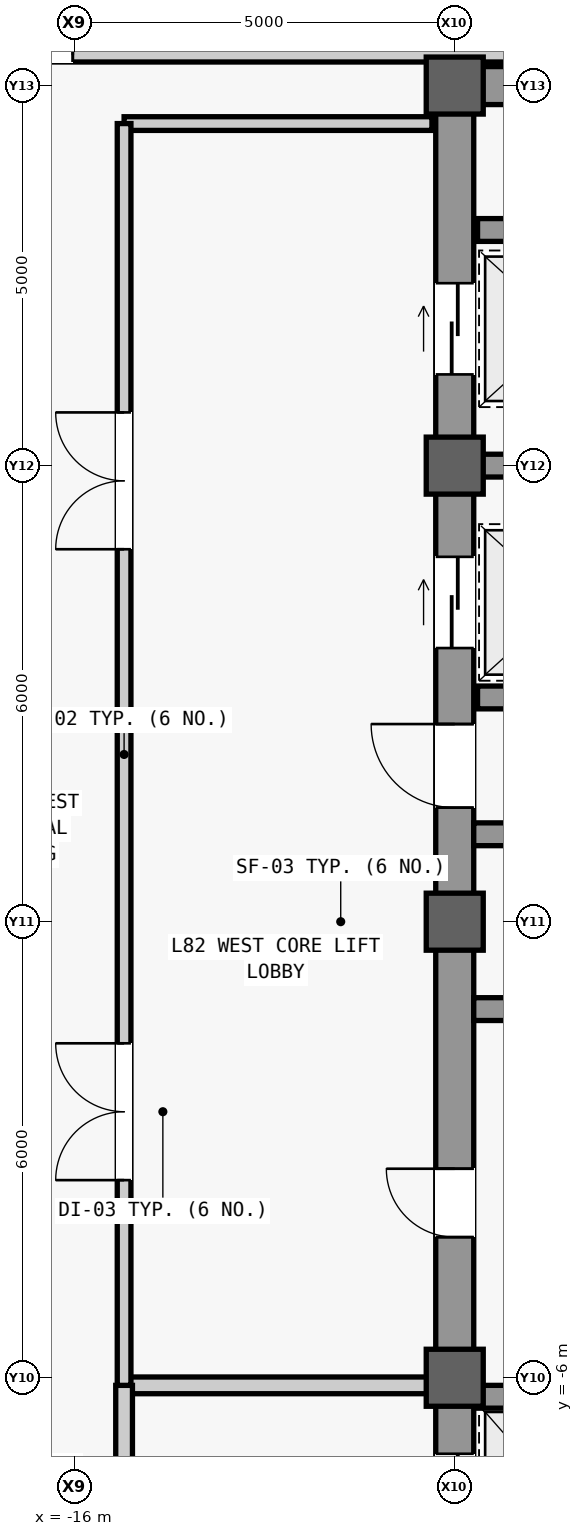
"""IFC4 building model, lengths in metres.
Left out: names, types, materials, properties, quantities, classifications, styles, units other than length and angle.
Written with IfcOpenShell. Run it as: python <this file> out.ifc"""

import sys

from ifc_helpers import new_model, si_unit, direction, frame, frame_2d, origin, origin_2d, place, context, subcontext, project, spatial, rectangle, extrude, source, transform, mapped, element, fill, save


model = new_model("IFC4")
c1 = context("Model", 3, precision=1e-05, world=origin(), true_north=direction((0.0, 1.0)))
c2 = subcontext(c1, "Body", "Model", "MODEL_VIEW")
j1 = project(units=[si_unit("LENGTHUNIT", "METRE"), si_unit("PLANEANGLEUNIT", "RADIAN")], contexts=[c1])
p1 = place(None, origin())
s1 = spatial("IfcSite", under=j1, at=p1, CompositionType="ELEMENT")
p2 = place(p1, origin())
s2 = spatial("IfcBuilding", under=s1, at=p2, CompositionType="ELEMENT")
p3 = place(p2, frame((0.0, 0.0, 346.3)))
s3 = spatial("IfcBuildingStorey", under=s2, at=p3, CompositionType="ELEMENT", Elevation=346.3)
m1 = source(origin(), c2, "Body", "SweptSolid", [
    extrude(rectangle(XDim=22.0, YDim=0.5, at=frame_2d((11.0, 0.0))), origin(), (0.0, 0.0, 1.0), 3.74),
])
p4 = place(p3, frame((-11.0, -11.0, 0.0), z_axis=(0.0, 0.0, 1.0), x_axis=(0.0, 1.0, 0.0)))
e1 = element("IfcWall", 1, at=p4, inside=s3, PredefinedType="SHEAR", context=c2, shape_type="MappedRepresentation", body=[
    mapped(m1, transform((0.0, 0.0, 0.0), scale=1.0)),
])
m2 = source(origin(), c2, "Body", "SweptSolid", [
    extrude(rectangle(XDim=1.1, YDim=2.2, at=frame_2d((0.55, 1.1))), frame((0.0, 0.26, 0.0), z_axis=(0.0, -1.0, 0.0), x_axis=(1.0, 0.0, 0.0)), (0.0, 0.0, 1.0), 0.52),
])
p5 = place(p4, frame((0.8, 0.0, 0.0)))
e2 = element("IfcOpeningElement", 2, at=p5, cuts=e1, PredefinedType="OPENING", context=c2, shape_type="MappedRepresentation", body=[
    mapped(m2, transform((0.0, 0.0, 0.0), scale=1.0)),
])
p6 = place(p4, frame((12.5, 0.0, 0.0)))
e3 = element("IfcOpeningElement", 3, at=p6, cuts=e1, PredefinedType="OPENING", context=c2, shape_type="MappedRepresentation", body=[
    mapped(m2, transform((0.0, 0.0, 0.0), scale=1.0)),
])
m3 = source(origin(), c2, "Body", "SweptSolid", [
    extrude(rectangle(XDim=0.9, YDim=2.15, at=frame_2d((0.45, 1.075))), frame((0.0, 0.26, 0.0), z_axis=(0.0, -1.0, 0.0), x_axis=(1.0, 0.0, 0.0)), (0.0, 0.0, 1.0), 0.52),
])
p7 = place(p4, frame((6.85, 0.0, 0.0)))
e4 = element("IfcOpeningElement", 4, at=p7, cuts=e1, PredefinedType="OPENING", context=c2, shape_type="MappedRepresentation", body=[
    mapped(m3, transform((0.0, 0.0, 0.0), scale=1.0)),
])
m4 = source(origin(), c2, "Body", "SweptSolid", [
    extrude(rectangle(XDim=1.2, YDim=2.3, at=frame_2d((0.6, 1.15))), frame((0.0, 0.26, 0.0), z_axis=(0.0, -1.0, 0.0), x_axis=(1.0, 0.0, 0.0)), (0.0, 0.0, 1.0), 0.52),
])
p8 = place(p4, frame((14.6, 0.0, 0.0)))
e5 = element("IfcOpeningElement", 5, at=p8, cuts=e1, PredefinedType="OPENING", context=c2, shape_type="MappedRepresentation", body=[
    mapped(m4, transform((0.0, 0.0, 0.0), scale=1.0)),
])
p9 = place(p4, frame((18.2, 0.0, 0.0)))
e6 = element("IfcOpeningElement", 6, at=p9, cuts=e1, PredefinedType="OPENING", context=c2, shape_type="MappedRepresentation", body=[
    mapped(m4, transform((0.0, 0.0, 0.0), scale=1.0)),
])
m5 = source(origin(), c2, "Body", "SweptSolid", [
    extrude(rectangle(XDim=1.3, YDim=2.3, at=frame_2d((0.65, 1.15))), frame((0.0, 0.26, 0.0), z_axis=(0.0, -1.0, 0.0), x_axis=(1.0, 0.0, 0.0)), (0.0, 0.0, 1.0), 0.52),
])
p10 = place(p4, frame((2.7, 0.0, 0.0)))
e7 = element("IfcOpeningElement", 7, at=p10, cuts=e1, PredefinedType="OPENING", context=c2, shape_type="MappedRepresentation", body=[
    mapped(m5, transform((0.0, 0.0, 0.0), scale=1.0)),
])
m6 = source(origin(), c2, "Body", "SweptSolid", [
    extrude(rectangle(XDim=5.9, YDim=0.5, at=frame_2d((2.95, 0.0))), origin(), (0.0, 0.0, 1.0), 3.74),
])
p11 = place(p3, frame((-10.75, 11.0, 0.0), z_axis=(0.0, 0.0, 1.0), x_axis=(1.0, 0.0, 0.0)))
e8 = element("IfcWall", 8, at=p11, inside=s3, PredefinedType="SHEAR", context=c2, shape_type="MappedRepresentation", body=[
    mapped(m6, transform((0.0, 0.0, 0.0), scale=1.0)),
])
m7 = source(origin(), c2, "Body", "SweptSolid", [
    extrude(rectangle(XDim=5.65, YDim=0.3, at=frame_2d((2.825, 0.0))), origin(), (0.0, 0.0, 1.0), 3.74),
])
for number, where, z_axis, x_axis in (
    (9, (-10.75, -1.15, 0.0), (0.0, 0.0, 1.0), (1.0, 0.0, 0.0)),
    (10, (-10.75, 1.15, 0.0), (0.0, 0.0, 1.0), (1.0, 0.0, 0.0)),
):
    element("IfcWall", number, at=place(p3, frame(where, z_axis=z_axis, x_axis=x_axis)), inside=s3, PredefinedType="SHEAR", context=c2, shape_type="MappedRepresentation", body=[
        mapped(m7, transform((0.0, 0.0, 0.0), scale=1.0)),
    ])
m8 = source(origin(), c2, "Body", "SweptSolid", [
    extrude(rectangle(XDim=0.75, YDim=0.75, at=origin_2d()), origin(), (0.0, 0.0, 1.0), 4.0),
])
for number, where, z_axis, x_axis in (
    (11, (-11.0, -6.0, 0.0), (0.0, 0.0, 1.0), (1.0, 0.0, 0.0)),
    (12, (-11.0, 0.0, 0.0), (0.0, 0.0, 1.0), (1.0, 0.0, 0.0)),
    (13, (-11.0, 6.0, 0.0), (0.0, 0.0, 1.0), (1.0, 0.0, 0.0)),
    (14, (-11.0, 11.0, 0.0), (0.0, 0.0, 1.0), (1.0, 0.0, 0.0)),
):
    element("IfcColumn", number, at=place(p3, frame(where, z_axis=z_axis, x_axis=x_axis)), inside=s3, PredefinedType="COLUMN", context=c2, shape_type="MappedRepresentation", body=[
        mapped(m8, transform((0.0, 0.0, 0.0), scale=1.0)),
    ])
m9 = source(origin(), c2, "Body", "SweptSolid", [
    extrude(rectangle(XDim=2.2, YDim=0.3, at=frame_2d((1.1, 0.0))), origin(), (0.0, 0.0, 1.0), 3.74),
])
for number, where, z_axis, x_axis in (
    (15, (-10.7, -6.25, 0.0), (0.0, 0.0, 1.0), (1.0, 0.0, 0.0)),
    (16, (-10.7, 2.95, 0.0), (0.0, 0.0, 1.0), (1.0, 0.0, 0.0)),
    (17, (-10.7, 6.0, 0.0), (0.0, 0.0, 1.0), (1.0, 0.0, 0.0)),
    (18, (-10.7, 9.1, 0.0), (0.0, 0.0, 1.0), (1.0, 0.0, 0.0)),
):
    element("IfcWall", number, at=place(p3, frame(where, z_axis=z_axis, x_axis=x_axis)), inside=s3, PredefinedType="SHEAR", context=c2, shape_type="MappedRepresentation", body=[
        mapped(m9, transform((0.0, 0.0, 0.0), scale=1.0)),
    ])
m10 = source(origin(), c2, "Body", "SweptSolid", [
    extrude(rectangle(XDim=4.05, YDim=0.22, at=frame_2d((2.025, 0.0))), origin(), (0.0, 0.0, 1.0), 3.124),
])
p12 = place(p3, frame((-15.35, -6.1, 0.0), z_axis=(0.0, 0.0, 1.0), x_axis=(1.0, 0.0, 0.0)))
e19 = element("IfcWall", 19, at=p12, inside=s3, PredefinedType="PARTITIONING", context=c2, shape_type="MappedRepresentation", body=[
    mapped(m10, transform((0.0, 0.0, 0.0), scale=1.0)),
])
m11 = source(origin(), c2, "Body", "SweptSolid", [
    extrude(rectangle(XDim=4.4, YDim=0.22, at=frame_2d((2.2, 0.0))), origin(), (0.0, 0.0, 1.0), 3.74),
])
p13 = place(p3, frame((-15.35, -10.5, 0.0), z_axis=(0.0, 0.0, 1.0), x_axis=(0.0, 1.0, 0.0)))
e20 = element("IfcWall", 20, at=p13, inside=s3, PredefinedType="PARTITIONING", context=c2, shape_type="MappedRepresentation", body=[
    mapped(m11, transform((0.0, 0.0, 0.0), scale=1.0)),
])
m12 = source(origin(), c2, "Body", "SweptSolid", [
    extrude(rectangle(XDim=1.2, YDim=2.2, at=frame_2d((0.6, 1.1))), frame((0.0, 0.12, 0.0), z_axis=(0.0, -1.0, 0.0), x_axis=(1.0, 0.0, 0.0)), (0.0, 0.0, 1.0), 0.24),
])
p14 = place(p13, frame((1.6, 0.0, 0.0)))
e21 = element("IfcOpeningElement", 21, at=p14, cuts=e20, PredefinedType="OPENING", context=c2, shape_type="MappedRepresentation", body=[
    mapped(m12, transform((0.0, 0.0, 0.0), scale=1.0)),
])
m13 = source(origin(), c2, "Body", "SweptSolid", [
    extrude(rectangle(XDim=4.05, YDim=0.18, at=frame_2d((2.025, 0.0))), origin(), (0.0, 0.0, 1.0), 3.74),
])
p15 = place(p3, frame((-15.35, 10.5, 0.0), z_axis=(0.0, 0.0, 1.0), x_axis=(1.0, 0.0, 0.0)))
e22 = element("IfcWall", 22, at=p15, inside=s3, PredefinedType="PARTITIONING", context=c2, shape_type="MappedRepresentation", body=[
    mapped(m13, transform((0.0, 0.0, 0.0), scale=1.0)),
])
m14 = source(origin(), c2, "Body", "SweptSolid", [
    extrude(rectangle(XDim=16.6, YDim=0.18, at=frame_2d((8.3, 0.0))), origin(), (0.0, 0.0, 1.0), 3.74),
])
p16 = place(p3, frame((-15.35, -6.1, 0.0), z_axis=(0.0, 0.0, 1.0), x_axis=(0.0, 1.0, 0.0)))
e23 = element("IfcWall", 23, at=p16, inside=s3, PredefinedType="PARTITIONING", context=c2, shape_type="MappedRepresentation", body=[
    mapped(m14, transform((0.0, 0.0, 0.0), scale=1.0)),
])
m15 = source(origin(), c2, "Body", "SweptSolid", [
    extrude(rectangle(XDim=1.8, YDim=2.25, at=frame_2d((0.9, 1.125))), frame((0.0, 0.1, 0.0), z_axis=(0.0, -1.0, 0.0), x_axis=(1.0, 0.0, 0.0)), (0.0, 0.0, 1.0), 0.2),
])
p17 = place(p16, frame((2.7, 0.0, 0.0)))
e24 = element("IfcOpeningElement", 24, at=p17, cuts=e23, PredefinedType="OPENING", context=c2, shape_type="MappedRepresentation", body=[
    mapped(m15, transform((0.0, 0.0, 0.0), scale=1.0)),
])
p18 = place(p16, frame((11.0, 0.0, 0.0)))
e25 = element("IfcOpeningElement", 25, at=p18, cuts=e23, PredefinedType="OPENING", context=c2, shape_type="MappedRepresentation", body=[
    mapped(m15, transform((0.0, 0.0, 0.0), scale=1.0)),
])
m16 = source(origin(), c2, "Body", "SweptSolid", [
    extrude(rectangle(XDim=12.7, YDim=0.18, at=frame_2d((6.35, 0.0))), origin(), (0.0, 0.0, 1.0), 2.79),
])
p19 = place(p3, frame((-17.75, 11.4, 0.0), z_axis=(0.0, 0.0, 1.0), x_axis=(1.0, 0.0, 0.0)))
e26 = element("IfcWall", 26, at=p19, inside=s3, PredefinedType="PARTITIONING", context=c2, shape_type="MappedRepresentation", body=[
    mapped(m16, transform((0.0, 0.0, 0.0), scale=1.0)),
])
m17 = source(origin(), c2, "Body", "SweptSolid", [
    extrude(rectangle(XDim=1.05, YDim=2.2, at=frame_2d((0.525, 1.1))), frame((0.0, 0.1, 0.0), z_axis=(0.0, -1.0, 0.0), x_axis=(1.0, 0.0, 0.0)), (0.0, 0.0, 1.0), 0.2),
])
p20 = place(p19, frame((0.675, 0.0, 0.0)))
e27 = element("IfcOpeningElement", 27, at=p20, cuts=e26, PredefinedType="OPENING", context=c2, shape_type="MappedRepresentation", body=[
    mapped(m17, transform((0.0, 0.0, 0.0), scale=1.0)),
])
m18 = source(origin(), c2, "Body", "SweptSolid", [
    extrude(rectangle(XDim=1.1, YDim=2.2, at=frame_2d((0.55, 1.1))), frame((0.0, 0.025, 0.0), z_axis=(0.0, -1.0, 0.0), x_axis=(1.0, 0.0, 0.0)), (0.0, 0.0, 1.0), 0.05),
])
p21 = place(p6, origin())
e28 = element("IfcDoor", 28, at=p21, inside=s3, OperationType="SINGLE_SWING_RIGHT", PredefinedType="DOOR", context=c2, shape_type="MappedRepresentation", body=[
    mapped(m18, transform((0.0, 0.0, 0.0), scale=1.0)),
])
fill(e3, e28)
m19 = source(origin(), c2, "Body", "SweptSolid", [
    extrude(rectangle(XDim=0.9, YDim=2.15, at=frame_2d((0.45, 1.075))), frame((0.0, 0.025, 0.0), z_axis=(0.0, -1.0, 0.0), x_axis=(1.0, 0.0, 0.0)), (0.0, 0.0, 1.0), 0.05),
])
p22 = place(p7, origin())
e29 = element("IfcDoor", 29, at=p22, inside=s3, OperationType="SINGLE_SWING_RIGHT", PredefinedType="DOOR", context=c2, shape_type="MappedRepresentation", body=[
    mapped(m19, transform((0.0, 0.0, 0.0), scale=1.0)),
])
fill(e4, e29)
m20 = source(origin(), c2, "Body", "SweptSolid", [
    extrude(rectangle(XDim=1.8, YDim=2.25, at=frame_2d((0.9, 1.125))), frame((0.0, 0.025, 0.0), z_axis=(0.0, -1.0, 0.0), x_axis=(1.0, 0.0, 0.0)), (0.0, 0.0, 1.0), 0.05),
])
p23 = place(p17, origin())
e30 = element("IfcDoor", 30, at=p23, inside=s3, OperationType="SINGLE_SWING_LEFT", PredefinedType="DOOR", context=c2, shape_type="MappedRepresentation", body=[
    mapped(m20, transform((0.0, 0.0, 0.0), scale=1.0)),
])
fill(e24, e30)
p24 = place(p18, origin())
e31 = element("IfcDoor", 31, at=p24, inside=s3, OperationType="SINGLE_SWING_RIGHT", PredefinedType="DOOR", context=c2, shape_type="MappedRepresentation", body=[
    mapped(m20, transform((0.0, 0.0, 0.0), scale=1.0)),
])
fill(e25, e31)
m21 = source(origin(), c2, "Body", "SweptSolid", [
    extrude(rectangle(XDim=1.05, YDim=2.2, at=frame_2d((0.525, 1.1))), frame((0.0, 0.025, 0.0), z_axis=(0.0, -1.0, 0.0), x_axis=(1.0, 0.0, 0.0)), (0.0, 0.0, 1.0), 0.05),
])
p25 = place(p20, origin())
e32 = element("IfcDoor", 32, at=p25, inside=s3, OperationType="SINGLE_SWING_RIGHT", PredefinedType="DOOR", context=c2, shape_type="MappedRepresentation", body=[
    mapped(m21, transform((0.0, 0.0, 0.0), scale=1.0)),
])
fill(e27, e32)
m22 = source(origin(), c2, "Body", "SweptSolid", [
    extrude(rectangle(XDim=1.2, YDim=2.3, at=frame_2d((0.6, 1.15))), frame((0.0, 0.025, 0.0), z_axis=(0.0, -1.0, 0.0), x_axis=(1.0, 0.0, 0.0)), (0.0, 0.0, 1.0), 0.05),
])
p26 = place(p8, origin())
e33 = element("IfcDoor", 33, at=p26, inside=s3, OperationType="SLIDING_TO_LEFT", PredefinedType="DOOR", context=c2, shape_type="MappedRepresentation", body=[
    mapped(m22, transform((0.0, 0.0, 0.0), scale=1.0)),
])
fill(e5, e33)
p27 = place(p9, origin())
e34 = element("IfcDoor", 34, at=p27, inside=s3, OperationType="SLIDING_TO_LEFT", PredefinedType="DOOR", context=c2, shape_type="MappedRepresentation", body=[
    mapped(m22, transform((0.0, 0.0, 0.0), scale=1.0)),
])
fill(e6, e34)
m23 = source(origin(), c2, "Body", "SweptSolid", [
    extrude(rectangle(XDim=1.3, YDim=2.3, at=frame_2d((0.65, 1.15))), frame((0.0, 0.025, 0.0), z_axis=(0.0, -1.0, 0.0), x_axis=(1.0, 0.0, 0.0)), (0.0, 0.0, 1.0), 0.05),
])
p28 = place(p10, origin())
e35 = element("IfcDoor", 35, at=p28, inside=s3, OperationType="SLIDING_TO_LEFT", PredefinedType="DOOR", context=c2, shape_type="MappedRepresentation", body=[
    mapped(m23, transform((0.0, 0.0, 0.0), scale=1.0)),
])
fill(e7, e35)
save(model, sys.argv[1])
